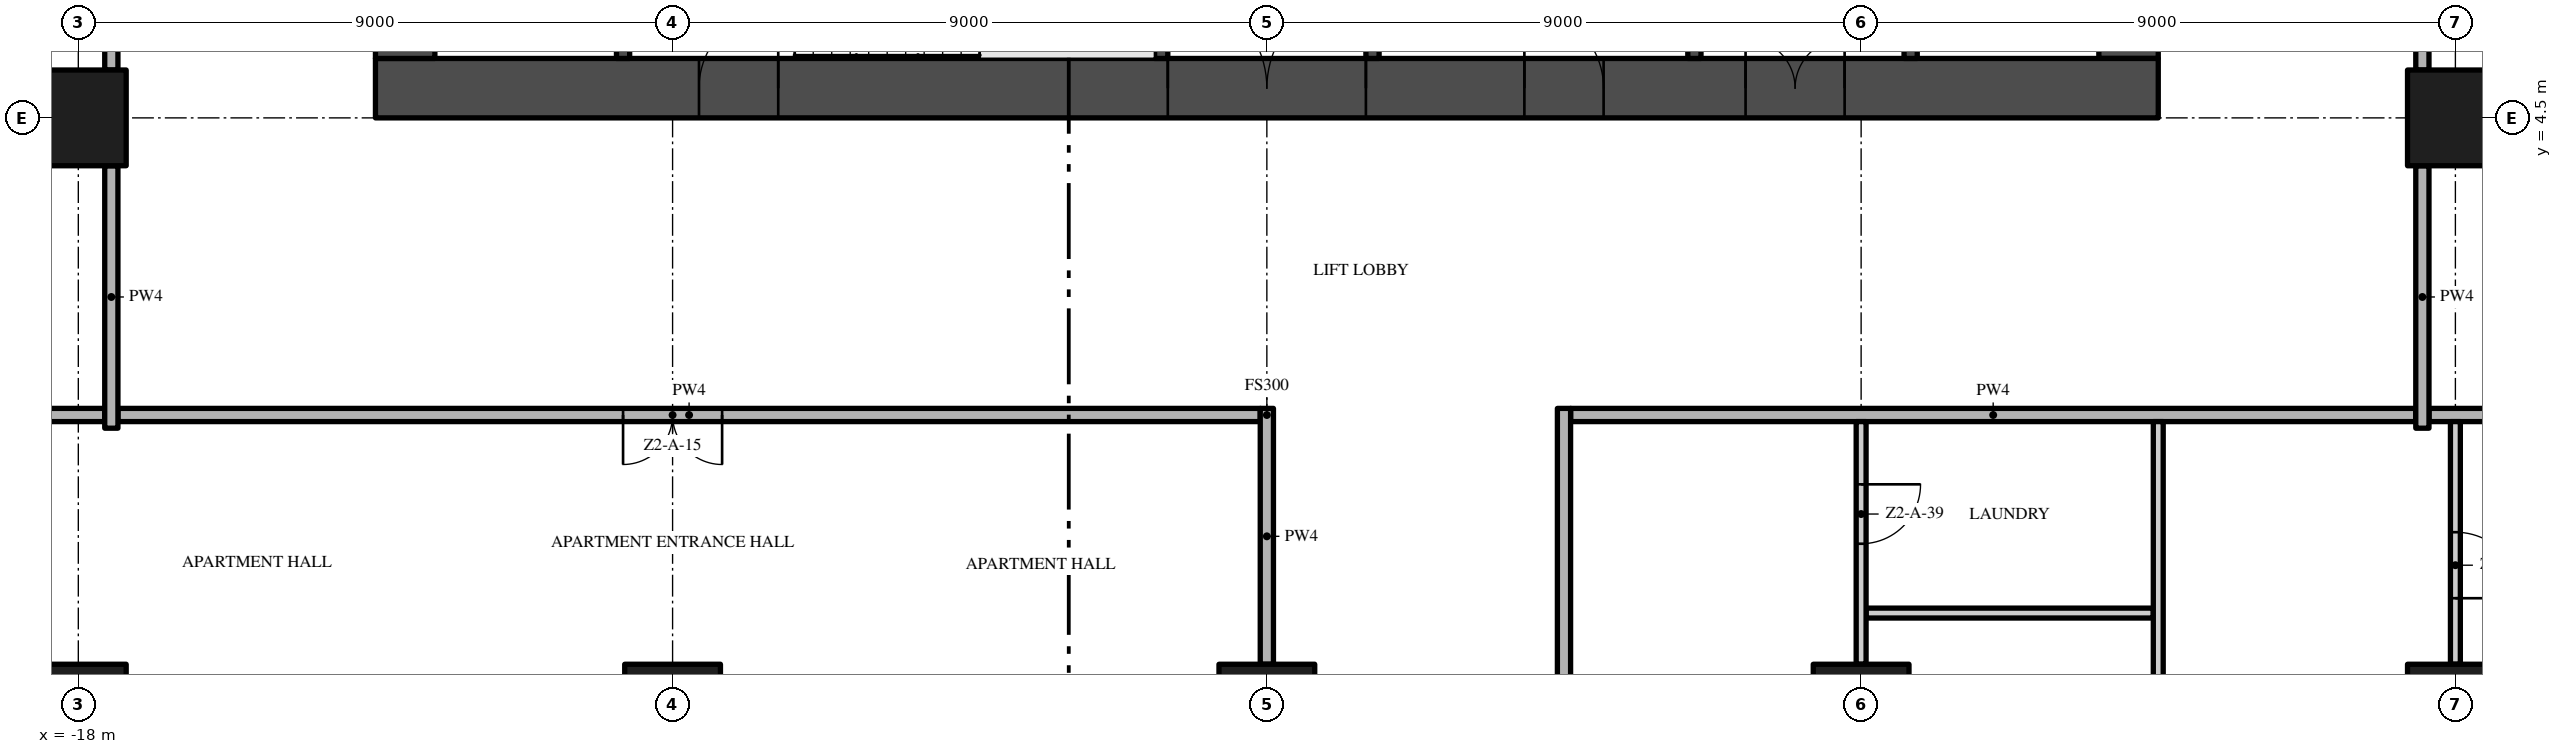
"""IFC4 building model, lengths in metres.
Left out: names, types, materials, properties, quantities, classifications, styles, units other than length and angle.
Written with IfcOpenShell. Run it as: python <this file> out.ifc"""

import sys

from ifc_helpers import new_model, si_unit, direction, frame, frame_2d, origin, origin_2d, place, context, subcontext, project, spatial, rectangle, extrude, element, fill, save


model = new_model("IFC4")
c1 = context("Model", 3, precision=1e-05, world=origin(), true_north=direction((0.0, 1.0)))
c2 = subcontext(c1, "Body", "Model", "MODEL_VIEW")
j1 = project(units=[si_unit("LENGTHUNIT", "METRE"), si_unit("PLANEANGLEUNIT", "RADIAN")], contexts=[c1])
p1 = place(None, origin())
s1 = spatial("IfcSite", under=j1, at=p1, CompositionType="ELEMENT")
p2 = place(p1, origin())
s2 = spatial("IfcBuilding", under=s1, at=p2, CompositionType="ELEMENT")
p3 = place(p2, frame((0.0, 0.0, 73.2)))
s3 = spatial("IfcBuildingStorey", under=s2, at=p3, CompositionType="ELEMENT", Elevation=73.2)
p4 = place(p3, frame((-13.5, 4.95, -0.3), z_axis=(0.0, 0.0, 1.0), x_axis=(1.0, 0.0, 0.0)))
e1 = element("IfcWall", 1, at=p4, inside=s3, PredefinedType="SHEAR", context=c2, shape_type="SweptSolid", body=[
    extrude(rectangle(XDim=27.0, YDim=0.9, at=frame_2d((13.5, 0.0))), origin(), (0.0, 0.0, 1.0), 3.8),
])
p5 = place(p4, frame((12.0, 0.0, 0.3)))
e2 = element("IfcOpeningElement", 2, at=p5, cuts=e1, PredefinedType="OPENING", context=c2, shape_type="SweptSolid", body=[
    extrude(rectangle(XDim=3.0, YDim=2.4, at=frame_2d((1.5, 1.2))), frame((0.0, 0.46, 0.0), z_axis=(0.0, -1.0, 0.0), x_axis=(1.0, 0.0, 0.0)), (0.0, 0.0, 1.0), 0.92),
])
p6 = place(p4, frame((4.9, 0.0, 0.3)))
e3 = element("IfcOpeningElement", 3, at=p6, cuts=e1, PredefinedType="OPENING", context=c2, shape_type="SweptSolid", body=[
    extrude(rectangle(XDim=1.2, YDim=2.2, at=frame_2d((0.6, 1.1))), frame((0.0, 0.46, 0.0), z_axis=(0.0, -1.0, 0.0), x_axis=(1.0, 0.0, 0.0)), (0.0, 0.0, 1.0), 0.92),
])
p7 = place(p4, frame((20.75, 0.0, 0.3)))
e4 = element("IfcOpeningElement", 4, at=p7, cuts=e1, PredefinedType="OPENING", context=c2, shape_type="SweptSolid", body=[
    extrude(rectangle(XDim=1.5, YDim=2.2, at=frame_2d((0.75, 1.1))), frame((0.0, 0.46, 0.0), z_axis=(0.0, -1.0, 0.0), x_axis=(1.0, 0.0, 0.0)), (0.0, 0.0, 1.0), 0.92),
])
p8 = place(p4, frame((17.4, 0.0, 0.3)))
e5 = element("IfcOpeningElement", 5, at=p8, cuts=e1, PredefinedType="OPENING", context=c2, shape_type="SweptSolid", body=[
    extrude(rectangle(XDim=1.2, YDim=2.2, at=frame_2d((0.6, 1.1))), frame((0.0, 0.46, 0.0), z_axis=(0.0, -1.0, 0.0), x_axis=(1.0, 0.0, 0.0)), (0.0, 0.0, 1.0), 0.92),
])
p9 = place(p3, frame((13.05, 5.4, -0.3), z_axis=(0.0, 0.0, 1.0), x_axis=(0.0, 1.0, 0.0)))
e6 = element("IfcWall", 6, at=p9, inside=s3, PredefinedType="SHEAR", context=c2, shape_type="SweptSolid", body=[
    extrude(rectangle(XDim=16.2, YDim=0.9, at=frame_2d((8.1, 0.0))), origin(), (0.0, 0.0, 1.0), 3.8),
])
p10 = place(p9, frame((6.0, 0.0, 0.3)))
e7 = element("IfcOpeningElement", 7, at=p10, cuts=e6, PredefinedType="OPENING", context=c2, shape_type="SweptSolid", body=[
    extrude(rectangle(XDim=1.2, YDim=2.2, at=frame_2d((0.6, 1.1))), frame((0.0, 0.46, 0.0), z_axis=(0.0, -1.0, 0.0), x_axis=(1.0, 0.0, 0.0)), (0.0, 0.0, 1.0), 0.92),
])
p11 = place(p3, frame((-13.05, 21.6, -0.3), z_axis=(0.0, 0.0, 1.0), x_axis=(0.0, -1.0, 0.0)))
e8 = element("IfcWall", 8, at=p11, inside=s3, PredefinedType="SHEAR", context=c2, shape_type="SweptSolid", body=[
    extrude(rectangle(XDim=16.2, YDim=0.9, at=frame_2d((8.1, 0.0))), origin(), (0.0, 0.0, 1.0), 3.8),
])
p12 = place(p11, frame((9.0, 0.0, 0.3)))
e9 = element("IfcOpeningElement", 9, at=p12, cuts=e8, PredefinedType="OPENING", context=c2, shape_type="SweptSolid", body=[
    extrude(rectangle(XDim=1.2, YDim=2.2, at=frame_2d((0.6, 1.1))), frame((0.0, 0.46, 0.0), z_axis=(0.0, -1.0, 0.0), x_axis=(1.0, 0.0, 0.0)), (0.0, 0.0, 1.0), 0.92),
])
for number, where, z_axis, x_axis in (
    (10, (-18.0, -4.5, 0.0), (0.0, 0.0, 1.0), (1.0, 0.0, 0.0)),
    (11, (-18.0, 4.5, 0.0), (0.0, 0.0, 1.0), (1.0, 0.0, 0.0)),
    (12, (-9.0, -4.5, 0.0), (0.0, 0.0, 1.0), (1.0, 0.0, 0.0)),
    (13, (0.0, -4.5, 0.0), (0.0, 0.0, 1.0), (1.0, 0.0, 0.0)),
    (14, (18.0, -4.5, 0.0), (0.0, 0.0, 1.0), (1.0, 0.0, 0.0)),
    (15, (18.0, 4.5, 0.0), (0.0, 0.0, 1.0), (1.0, 0.0, 0.0)),
    (16, (9.0, -4.5, 0.0), (0.0, 0.0, 1.0), (1.0, 0.0, 0.0)),
):
    element("IfcColumn", number, at=place(p3, frame(where, z_axis=z_axis, x_axis=x_axis)), inside=s3, PredefinedType="COLUMN", context=c2, shape_type="SweptSolid", body=[
        extrude(rectangle(XDim=1.45, YDim=1.45, at=origin_2d()), origin(), (0.0, 0.0, 1.0), 3.5),
    ])
for number, where, z_axis, x_axis in (
    (17, (-9.75, 5.4, 0.0), (0.0, 0.0, 1.0), (0.0, 1.0, 0.0)),
    (18, (-1.6, 5.4, 0.0), (0.0, 0.0, 1.0), (0.0, 1.0, 0.0)),
):
    element("IfcWall", number, at=place(p3, frame(where, z_axis=z_axis, x_axis=x_axis)), inside=s3, PredefinedType="SHEAR", context=c2, shape_type="SweptSolid", body=[
        extrude(rectangle(XDim=2.55, YDim=0.2, at=frame_2d((1.275, 0.0))), origin(), (0.0, 0.0, 1.0), 3.5),
    ])
p13 = place(p3, frame((1.6, 11.5, 0.0), z_axis=(0.0, 0.0, 1.0), x_axis=(0.0, -1.0, 0.0)))
e19 = element("IfcWall", 19, at=p13, inside=s3, PredefinedType="SHEAR", context=c2, shape_type="SweptSolid", body=[
    extrude(rectangle(XDim=6.1, YDim=0.2, at=frame_2d((3.05, 0.0))), origin(), (0.0, 0.0, 1.0), 3.5),
])
p14 = place(p13, frame((2.2, 0.0, 0.0)))
e20 = element("IfcOpeningElement", 20, at=p14, cuts=e19, PredefinedType="OPENING", context=c2, shape_type="SweptSolid", body=[
    extrude(rectangle(XDim=0.9, YDim=2.1, at=frame_2d((0.45, 1.05))), frame((0.0, 0.11, 0.0), z_axis=(0.0, -1.0, 0.0), x_axis=(1.0, 0.0, 0.0)), (0.0, 0.0, 1.0), 0.22),
])
p15 = place(p3, frame((6.475, 5.4, 0.0), z_axis=(0.0, 0.0, 1.0), x_axis=(0.0, 1.0, 0.0)))
e21 = element("IfcWall", 21, at=p15, inside=s3, PredefinedType="SHEAR", context=c2, shape_type="SweptSolid", body=[
    extrude(rectangle(XDim=6.1, YDim=0.2, at=frame_2d((3.05, 0.0))), origin(), (0.0, 0.0, 1.0), 3.5),
])
p16 = place(p3, frame((9.75, 5.4, 0.0), z_axis=(0.0, 0.0, 1.0), x_axis=(0.0, 1.0, 0.0)))
e22 = element("IfcWall", 22, at=p16, inside=s3, PredefinedType="SHEAR", context=c2, shape_type="SweptSolid", body=[
    extrude(rectangle(XDim=2.2, YDim=0.2, at=frame_2d((1.1, 0.0))), origin(), (0.0, 0.0, 1.0), 3.5),
])
p17 = place(p16, frame((0.55, 0.0, 0.0)))
e23 = element("IfcOpeningElement", 23, at=p17, cuts=e22, PredefinedType="OPENING", context=c2, shape_type="SweptSolid", body=[
    extrude(rectangle(XDim=1.1, YDim=2.1, at=frame_2d((0.55, 1.05))), frame((0.0, 0.11, 0.0), z_axis=(0.0, -1.0, 0.0), x_axis=(1.0, 0.0, 0.0)), (0.0, 0.0, 1.0), 0.22),
])
p18 = place(p3, frame((9.075, -3.0, 0.0), z_axis=(0.0, 0.0, 1.0), x_axis=(1.0, 0.0, 0.0)))
e24 = element("IfcWall", 24, at=p18, inside=s3, PredefinedType="PARTITIONING", context=c2, shape_type="SweptSolid", body=[
    extrude(rectangle(XDim=4.35, YDim=0.15, at=frame_2d((2.175, 0.0))), origin(), (0.0, 0.0, 1.0), 3.5),
])
p19 = place(p3, frame((-0.1, 0.0, 0.0), z_axis=(0.0, 0.0, 1.0), x_axis=(-1.0, 0.0, 0.0)))
e25 = element("IfcWall", 25, at=p19, inside=s3, PredefinedType="PARTITIONING", context=c2, shape_type="SweptSolid", body=[
    extrude(rectangle(XDim=17.3, YDim=0.2, at=frame_2d((8.65, 0.0))), origin(), (0.0, 0.0, 1.0), 3.5),
])
p20 = place(p19, frame((8.15, 0.0, 0.0)))
e26 = element("IfcOpeningElement", 26, at=p20, cuts=e25, PredefinedType="OPENING", context=c2, shape_type="SweptSolid", body=[
    extrude(rectangle(XDim=1.5, YDim=2.4, at=frame_2d((0.75, 1.2))), frame((0.0, 0.11, 0.0), z_axis=(0.0, -1.0, 0.0), x_axis=(1.0, 0.0, 0.0)), (0.0, 0.0, 1.0), 0.22),
])
p21 = place(p3, frame((4.6, 0.0, 0.0), z_axis=(0.0, 0.0, 1.0), x_axis=(1.0, 0.0, 0.0)))
e27 = element("IfcWall", 27, at=p21, inside=s3, PredefinedType="PARTITIONING", context=c2, shape_type="SweptSolid", body=[
    extrude(rectangle(XDim=12.8, YDim=0.2, at=frame_2d((6.4, 0.0))), origin(), (0.0, 0.0, 1.0), 3.5),
])
for number, where, z_axis, x_axis in (
    (28, (-26.7, 0.0, 0.0), (0.0, 0.0, 1.0), (1.0, 0.0, 0.0)),
    (29, (17.6, 0.0, 0.0), (0.0, 0.0, 1.0), (1.0, 0.0, 0.0)),
):
    element("IfcWall", number, at=place(p3, frame(where, z_axis=z_axis, x_axis=x_axis)), inside=s3, PredefinedType="PARTITIONING", context=c2, shape_type="SweptSolid", body=[
        extrude(rectangle(XDim=9.1, YDim=0.2, at=frame_2d((4.55, 0.0))), origin(), (0.0, 0.0, 1.0), 3.5),
    ])
p22 = place(p3, frame((-17.5, -0.2, 0.0), z_axis=(0.0, 0.0, 1.0), x_axis=(0.0, 1.0, 0.0)))
e30 = element("IfcWall", 30, at=p22, inside=s3, PredefinedType="PARTITIONING", context=c2, shape_type="SweptSolid", body=[
    extrude(rectangle(XDim=3.975, YDim=0.2, at=frame_2d((1.988, 0.0))), origin(), (0.0, 0.0, 1.0), 3.5),
])
p23 = place(p3, frame((-17.5, 5.225, 0.0), z_axis=(0.0, 0.0, 1.0), x_axis=(0.0, 1.0, 0.0)))
e31 = element("IfcWall", 31, at=p23, inside=s3, PredefinedType="PARTITIONING", context=c2, shape_type="SweptSolid", body=[
    extrude(rectangle(XDim=7.55, YDim=0.2, at=frame_2d((3.775, 0.0))), origin(), (0.0, 0.0, 1.0), 3.5),
])
p24 = place(p3, frame((0.0, -3.775, 0.0), z_axis=(0.0, 0.0, 1.0), x_axis=(0.0, 1.0, 0.0)))
e32 = element("IfcWall", 32, at=p24, inside=s3, PredefinedType="PARTITIONING", context=c2, shape_type="SweptSolid", body=[
    extrude(rectangle(XDim=3.875, YDim=0.2, at=frame_2d((1.938, 0.0))), origin(), (0.0, 0.0, 1.0), 3.5),
])
p25 = place(p3, frame((4.5, 0.1, 0.0), z_axis=(0.0, 0.0, 1.0), x_axis=(0.0, -1.0, 0.0)))
e33 = element("IfcWall", 33, at=p25, inside=s3, PredefinedType="PARTITIONING", context=c2, shape_type="SweptSolid", body=[
    extrude(rectangle(XDim=22.3, YDim=0.2, at=frame_2d((11.15, 0.0))), origin(), (0.0, 0.0, 1.0), 3.5),
])
p26 = place(p25, frame((10.6, 0.0, 0.0)))
e34 = element("IfcOpeningElement", 34, at=p26, cuts=e33, PredefinedType="OPENING", context=c2, shape_type="SweptSolid", body=[
    extrude(rectangle(XDim=1.5, YDim=2.4, at=frame_2d((0.75, 1.2))), frame((0.0, 0.11, 0.0), z_axis=(0.0, -1.0, 0.0), x_axis=(1.0, 0.0, 0.0)), (0.0, 0.0, 1.0), 0.22),
])
p27 = place(p3, frame((9.0, -0.1, 0.0), z_axis=(0.0, 0.0, 1.0), x_axis=(0.0, -1.0, 0.0)))
e35 = element("IfcWall", 35, at=p27, inside=s3, PredefinedType="PARTITIONING", context=c2, shape_type="SweptSolid", body=[
    extrude(rectangle(XDim=3.675, YDim=0.15, at=frame_2d((1.837, 0.0))), origin(), (0.0, 0.0, 1.0), 3.5),
])
p28 = place(p27, frame((0.95, 0.0, 0.0)))
e36 = element("IfcOpeningElement", 36, at=p28, cuts=e35, PredefinedType="OPENING", context=c2, shape_type="SweptSolid", body=[
    extrude(rectangle(XDim=0.9, YDim=2.1, at=frame_2d((0.45, 1.05))), frame((0.0, 0.085, 0.0), z_axis=(0.0, -1.0, 0.0), x_axis=(1.0, 0.0, 0.0)), (0.0, 0.0, 1.0), 0.17),
])
p29 = place(p3, frame((13.5, -6.075, 0.0), z_axis=(0.0, 0.0, 1.0), x_axis=(0.0, 1.0, 0.0)))
e37 = element("IfcWall", 37, at=p29, inside=s3, PredefinedType="PARTITIONING", context=c2, shape_type="SweptSolid", body=[
    extrude(rectangle(XDim=5.975, YDim=0.15, at=frame_2d((2.987, 0.0))), origin(), (0.0, 0.0, 1.0), 3.5),
])
p30 = place(p29, frame((1.175, 0.0, 0.0)))
e38 = element("IfcOpeningElement", 38, at=p30, cuts=e37, PredefinedType="OPENING", context=c2, shape_type="SweptSolid", body=[
    extrude(rectangle(XDim=0.8, YDim=2.0, at=frame_2d((0.4, 1.0))), frame((0.0, 0.085, 0.0), z_axis=(0.0, -1.0, 0.0), x_axis=(1.0, 0.0, 0.0)), (0.0, 0.0, 1.0), 0.17),
])
p31 = place(p3, frame((17.5, -0.2, 0.0), z_axis=(0.0, 0.0, 1.0), x_axis=(0.0, 1.0, 0.0)))
e39 = element("IfcWall", 39, at=p31, inside=s3, PredefinedType="PARTITIONING", context=c2, shape_type="SweptSolid", body=[
    extrude(rectangle(XDim=3.975, YDim=0.2, at=frame_2d((1.988, 0.0))), origin(), (0.0, 0.0, 1.0), 3.5),
])
p32 = place(p3, frame((17.5, 12.775, 0.0), z_axis=(0.0, 0.0, 1.0), x_axis=(0.0, -1.0, 0.0)))
e40 = element("IfcWall", 40, at=p32, inside=s3, PredefinedType="PARTITIONING", context=c2, shape_type="SweptSolid", body=[
    extrude(rectangle(XDim=7.55, YDim=0.2, at=frame_2d((3.775, 0.0))), origin(), (0.0, 0.0, 1.0), 3.5),
])
p33 = place(p32, frame((3.175, 0.0, 0.0)))
e41 = element("IfcOpeningElement", 41, at=p33, cuts=e40, PredefinedType="OPENING", context=c2, shape_type="SweptSolid", body=[
    extrude(rectangle(XDim=1.2, YDim=2.4, at=frame_2d((0.6, 1.2))), frame((0.0, 0.11, 0.0), z_axis=(0.0, -1.0, 0.0), x_axis=(1.0, 0.0, 0.0)), (0.0, 0.0, 1.0), 0.22),
])
p34 = place(p3, frame((18.0, -0.1, 0.0), z_axis=(0.0, 0.0, 1.0), x_axis=(0.0, -1.0, 0.0)))
e42 = element("IfcWall", 42, at=p34, inside=s3, PredefinedType="PARTITIONING", context=c2, shape_type="SweptSolid", body=[
    extrude(rectangle(XDim=3.675, YDim=0.15, at=frame_2d((1.837, 0.0))), origin(), (0.0, 0.0, 1.0), 3.5),
])
p35 = place(p34, frame((1.675, 0.0, 0.0)))
e43 = element("IfcOpeningElement", 43, at=p35, cuts=e42, PredefinedType="OPENING", context=c2, shape_type="SweptSolid", body=[
    extrude(rectangle(XDim=1.0, YDim=2.4, at=frame_2d((0.5, 1.2))), frame((0.0, 0.085, 0.0), z_axis=(0.0, -1.0, 0.0), x_axis=(1.0, 0.0, 0.0)), (0.0, 0.0, 1.0), 0.17),
])
p36 = place(p5, frame((3.0, 0.0, 0.0), z_axis=(0.0, 0.0, 1.0), x_axis=(-1.0, 0.0, 0.0)))
e44 = element("IfcDoor", 44, at=p36, inside=s3, OperationType="DOUBLE_DOOR_SINGLE_SWING", PredefinedType="DOOR", context=c2, shape_type="SweptSolid", body=[
    extrude(rectangle(XDim=3.0, YDim=2.4, at=frame_2d((1.5, 1.2))), frame((0.0, 0.025, 0.0), z_axis=(0.0, -1.0, 0.0), x_axis=(1.0, 0.0, 0.0)), (0.0, 0.0, 1.0), 0.05),
])
fill(e2, e44)
p37 = place(p6, frame((1.2, 0.0, 0.0), z_axis=(0.0, 0.0, 1.0), x_axis=(-1.0, 0.0, 0.0)))
e45 = element("IfcDoor", 45, at=p37, inside=s3, OperationType="SINGLE_SWING_LEFT", PredefinedType="DOOR", context=c2, shape_type="SweptSolid", body=[
    extrude(rectangle(XDim=1.2, YDim=2.2, at=frame_2d((0.6, 1.1))), frame((0.0, 0.025, 0.0), z_axis=(0.0, -1.0, 0.0), x_axis=(1.0, 0.0, 0.0)), (0.0, 0.0, 1.0), 0.05),
])
fill(e3, e45)
p38 = place(p7, frame((1.5, 0.0, 0.0), z_axis=(0.0, 0.0, 1.0), x_axis=(-1.0, 0.0, 0.0)))
e46 = element("IfcDoor", 46, at=p38, inside=s3, OperationType="DOUBLE_DOOR_SINGLE_SWING", PredefinedType="DOOR", context=c2, shape_type="SweptSolid", body=[
    extrude(rectangle(XDim=1.5, YDim=2.2, at=frame_2d((0.75, 1.1))), frame((0.0, 0.025, 0.0), z_axis=(0.0, -1.0, 0.0), x_axis=(1.0, 0.0, 0.0)), (0.0, 0.0, 1.0), 0.05),
])
fill(e4, e46)
p39 = place(p8, frame((1.2, 0.0, 0.0), z_axis=(0.0, 0.0, 1.0), x_axis=(-1.0, 0.0, 0.0)))
e47 = element("IfcDoor", 47, at=p39, inside=s3, OperationType="SINGLE_SWING_RIGHT", PredefinedType="DOOR", context=c2, shape_type="SweptSolid", body=[
    extrude(rectangle(XDim=1.2, YDim=2.2, at=frame_2d((0.6, 1.1))), frame((0.0, 0.025, 0.0), z_axis=(0.0, -1.0, 0.0), x_axis=(1.0, 0.0, 0.0)), (0.0, 0.0, 1.0), 0.05),
])
fill(e5, e47)
p40 = place(p20, origin())
e48 = element("IfcDoor", 48, at=p40, inside=s3, OperationType="DOUBLE_DOOR_SINGLE_SWING", PredefinedType="DOOR", context=c2, shape_type="SweptSolid", body=[
    extrude(rectangle(XDim=1.5, YDim=2.4, at=frame_2d((0.75, 1.2))), frame((0.0, 0.025, 0.0), z_axis=(0.0, -1.0, 0.0), x_axis=(1.0, 0.0, 0.0)), (0.0, 0.0, 1.0), 0.05),
])
fill(e26, e48)
p41 = place(p28, origin())
e49 = element("IfcDoor", 49, at=p41, inside=s3, OperationType="SINGLE_SWING_LEFT", PredefinedType="DOOR", context=c2, shape_type="SweptSolid", body=[
    extrude(rectangle(XDim=0.9, YDim=2.1, at=frame_2d((0.45, 1.05))), frame((0.0, 0.025, 0.0), z_axis=(0.0, -1.0, 0.0), x_axis=(1.0, 0.0, 0.0)), (0.0, 0.0, 1.0), 0.05),
])
fill(e36, e49)
p42 = place(p35, origin())
e50 = element("IfcDoor", 50, at=p42, inside=s3, OperationType="SINGLE_SWING_RIGHT", PredefinedType="DOOR", context=c2, shape_type="SweptSolid", body=[
    extrude(rectangle(XDim=1.0, YDim=2.4, at=frame_2d((0.5, 1.2))), frame((0.0, 0.025, 0.0), z_axis=(0.0, -1.0, 0.0), x_axis=(1.0, 0.0, 0.0)), (0.0, 0.0, 1.0), 0.05),
])
fill(e43, e50)
save(model, sys.argv[1])
